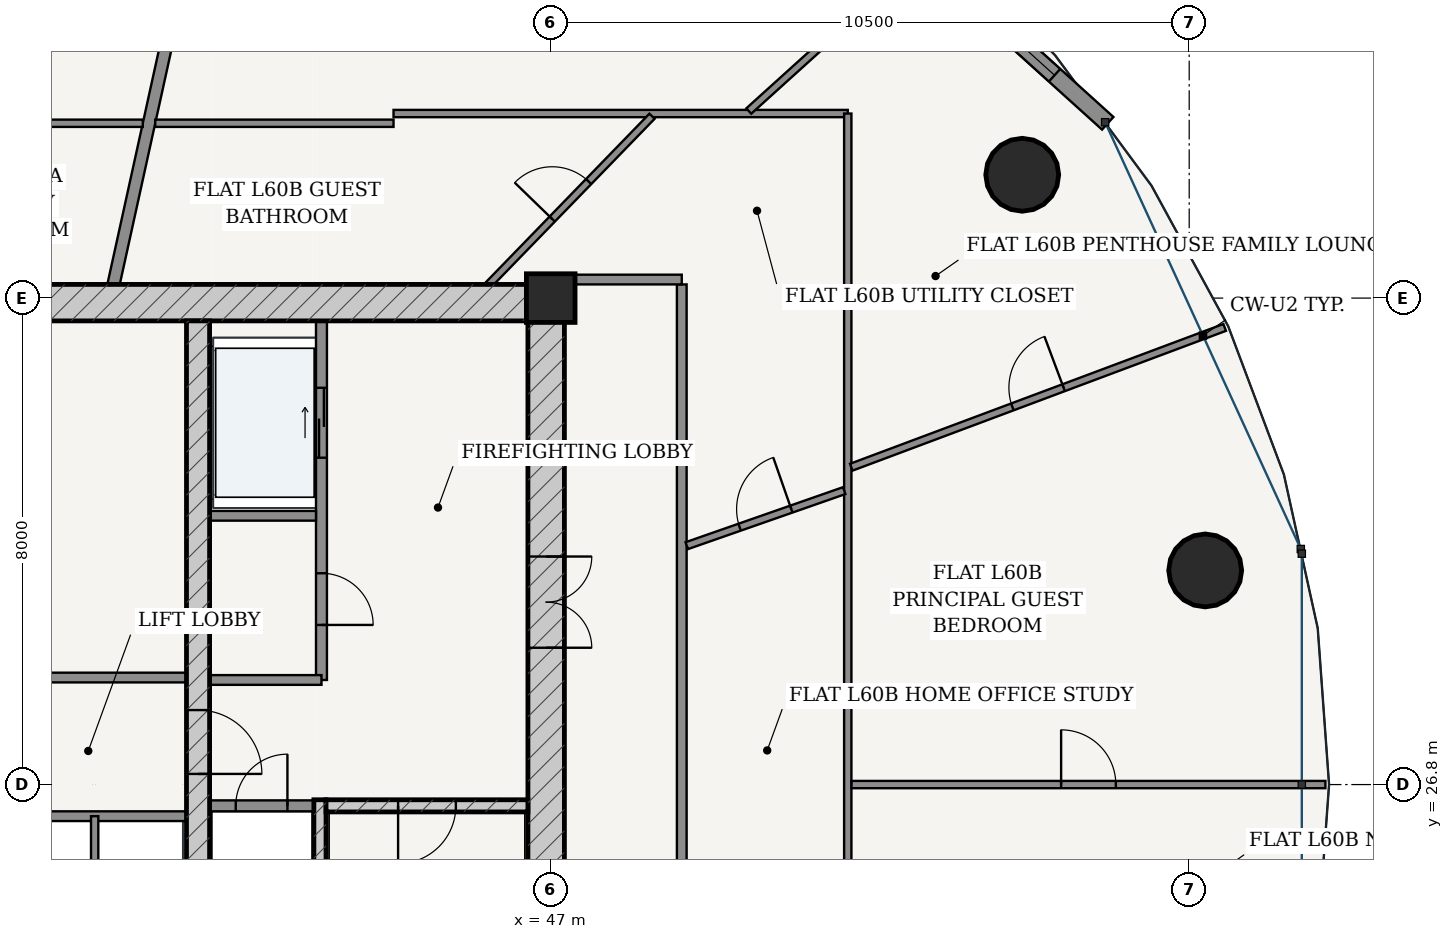
"""IFC4 building model, lengths in metres.
Left out: names, types, materials, properties, quantities, classifications, styles, units other than length and angle.
Written with IfcOpenShell. Run it as: python <this file> out.ifc"""

import sys

from ifc_helpers import new_model, si_unit, direction, frame, frame_2d, origin, origin_2d, place, context, subcontext, project, spatial, rectangle, hollow_circle, extrude, source, transform, mapped, element, fill, save


model = new_model("IFC4")
c1 = context("Model", 3, precision=1e-05, world=origin(), true_north=direction((-0.2419218956, 0.970295726276)))
c2 = subcontext(c1, "Body", "Model", "MODEL_VIEW")
j1 = project(units=[si_unit("LENGTHUNIT", "METRE"), si_unit("PLANEANGLEUNIT", "RADIAN")], contexts=[c1])
p1 = place(None, origin())
s1 = spatial("IfcSite", under=j1, at=p1, CompositionType="ELEMENT")
p2 = place(p1, origin())
s2 = spatial("IfcBuilding", under=s1, at=p2, CompositionType="ELEMENT")
p3 = place(p2, frame((0.0, 0.0, 228.2)))
s3 = spatial("IfcBuildingStorey", under=s2, at=p3, CompositionType="ELEMENT", Elevation=228.2)
p4 = place(p3, frame((47.0, 34.8, 0.0), z_axis=(0.0, 0.0, 1.0), x_axis=(1.0, 0.0, 0.0)))
e1 = element("IfcColumn", 1, at=p4, inside=s3, PredefinedType="COLUMN", context=c2, shape_type="SweptSolid", body=[
    extrude(rectangle(XDim=0.8, YDim=0.8, at=origin_2d()), origin(), (0.0, 0.0, 1.0), 3.7),
])
p5 = place(p3, frame((28.775, 34.725, 0.0), z_axis=(0.0, 0.0, 1.0), x_axis=(1.0, 0.0, 0.0)))
e2 = element("IfcWall", 2, at=p5, inside=s3, PredefinedType="SHEAR", context=c2, shape_type="SweptSolid", body=[
    extrude(rectangle(XDim=18.45, YDim=0.6, at=frame_2d((9.225, 0.0))), origin(), (0.0, 0.0, 1.0), 3.435),
])
p6 = place(p3, frame((46.925, 19.175, 0.0), z_axis=(0.0, 0.0, 1.0), x_axis=(0.0, 1.0, 0.0)))
e3 = element("IfcWall", 3, at=p6, inside=s3, PredefinedType="SHEAR", context=c2, shape_type="SweptSolid", body=[
    extrude(rectangle(XDim=15.25, YDim=0.6, at=frame_2d((7.625, 0.0))), origin(), (0.0, 0.0, 1.0), 3.435),
])
p7 = place(p6, frame((9.875, 0.0, 0.0)))
e4 = element("IfcOpeningElement", 4, at=p7, cuts=e3, PredefinedType="OPENING", context=c2, shape_type="SweptSolid", body=[
    extrude(rectangle(XDim=1.5, YDim=2.2, at=frame_2d((0.75, 1.1))), frame((0.0, 0.31, 0.0), z_axis=(0.0, -1.0, 0.0), x_axis=(1.0, 0.0, 0.0)), (0.0, 0.0, 1.0), 0.62),
])
p8 = place(p3, frame((43.205, 19.175, 0.0), z_axis=(0.0, 0.0, 1.0), x_axis=(0.0, 1.0, 0.0)))
e5 = element("IfcWall", 5, at=p8, inside=s3, PredefinedType="SOLIDWALL", context=c2, shape_type="SweptSolid", body=[
    extrude(rectangle(XDim=7.375, YDim=0.2, at=frame_2d((3.688, 0.0))), origin(), (0.0, 0.0, 1.0), 3.435),
])
p9 = place(p3, frame((43.305, 26.45, 0.0), z_axis=(0.0, 0.0, 1.0), x_axis=(1.0, 0.0, 0.0)))
e6 = element("IfcWall", 6, at=p9, inside=s3, PredefinedType="SOLIDWALL", context=c2, shape_type="SweptSolid", body=[
    extrude(rectangle(XDim=3.32, YDim=0.2, at=frame_2d((1.66, 0.0))), origin(), (0.0, 0.0, 1.0), 3.435),
])
p10 = place(p9, frame((1.185, 0.0, 0.0)))
e7 = element("IfcOpeningElement", 7, at=p10, cuts=e6, PredefinedType="OPENING", context=c2, shape_type="SweptSolid", body=[
    extrude(rectangle(XDim=0.95, YDim=2.15, at=frame_2d((0.475, 1.075))), frame((0.0, 0.11, 0.0), z_axis=(0.0, -1.0, 0.0), x_axis=(1.0, 0.0, 0.0)), (0.0, 0.0, 1.0), 0.22),
])
p11 = place(p3, frame((41.2, 19.175, 0.0), z_axis=(0.0, 0.0, 1.0), x_axis=(0.0, 1.0, 0.0)))
e8 = element("IfcWall", 8, at=p11, inside=s3, PredefinedType="SHEAR", context=c2, shape_type="SweptSolid", body=[
    extrude(rectangle(XDim=15.25, YDim=0.38, at=frame_2d((7.625, 0.0))), origin(), (0.0, 0.0, 1.0), 3.435),
])
p12 = place(p11, frame((7.8, 0.0, 0.0)))
e9 = element("IfcOpeningElement", 9, at=p12, cuts=e8, PredefinedType="OPENING", context=c2, shape_type="SweptSolid", body=[
    extrude(rectangle(XDim=1.05, YDim=2.15, at=frame_2d((0.525, 1.075))), frame((0.0, 0.2, 0.0), z_axis=(0.0, -1.0, 0.0), x_axis=(1.0, 0.0, 0.0)), (0.0, 0.0, 1.0), 0.4),
])
for number, where, z_axis, x_axis in (
    (10, (57.763, 30.321, 0.0), (0.0, 0.0, 1.0), (1.0, 0.0, 0.0)),
    (11, (54.754, 36.828, 0.0), (0.0, 0.0, 1.0), (1.0, 0.0, 0.0)),
):
    element("IfcColumn", number, at=place(p3, frame(where, z_axis=z_axis, x_axis=x_axis)), inside=s3, PredefinedType="COLUMN", context=c2, shape_type="SweptSolid", body=[
        extrude(hollow_circle(Radius=0.6, WallThickness=0.038, at=origin_2d()), origin(), (0.0, 0.0, 1.0), 3.7),
    ])
p13 = place(p3, frame((56.16, 37.674, 0.0), z_axis=(0.0, 0.0, 1.0), x_axis=(-0.741972126783, 0.670430729514, 0.0)))
e12 = element("IfcWall", 12, at=p13, inside=s3, PredefinedType="SOLIDWALL", context=c2, shape_type="SweptSolid", body=[
    extrude(rectangle(XDim=8.255, YDim=0.28, at=frame_2d((4.127, 0.0))), origin(), (0.0, 0.0, 1.0), 3.435),
])
p14 = place(p13, frame((1.179, 0.0, 0.85)))
e13 = element("IfcOpeningElement", 13, at=p14, cuts=e12, PredefinedType="OPENING", context=c2, shape_type="SweptSolid", body=[
    extrude(rectangle(XDim=2.1, YDim=1.95, at=frame_2d((1.05, 0.975))), frame((0.0, 0.15, 0.0), z_axis=(0.0, -1.0, 0.0), x_axis=(1.0, 0.0, 0.0)), (0.0, 0.0, 1.0), 0.3),
])
p15 = place(p13, frame((4.976, 0.0, 0.85)))
e14 = element("IfcOpeningElement", 14, at=p15, cuts=e12, PredefinedType="OPENING", context=c2, shape_type="SweptSolid", body=[
    extrude(rectangle(XDim=2.1, YDim=1.95, at=frame_2d((1.05, 0.975))), frame((0.0, 0.15, 0.0), z_axis=(0.0, -1.0, 0.0), x_axis=(1.0, 0.0, 0.0)), (0.0, 0.0, 1.0), 0.3),
])
p16 = place(p3, frame((41.39, 26.45, 0.0), z_axis=(0.0, 0.0, 1.0), x_axis=(1.0, 0.0, 0.0)))
e15 = element("IfcWall", 15, at=p16, inside=s3, PredefinedType="PARTITIONING", context=c2, shape_type="SweptSolid", body=[
    extrude(rectangle(XDim=1.71, YDim=0.18, at=frame_2d((0.855, 0.0))), origin(), (0.0, 0.0, 1.0), 3.435),
])
p17 = place(p16, frame((0.43, 0.0, 0.0)))
e16 = element("IfcOpeningElement", 16, at=p17, cuts=e15, PredefinedType="OPENING", context=c2, shape_type="SweptSolid", body=[
    extrude(rectangle(XDim=0.85, YDim=2.1, at=frame_2d((0.425, 1.05))), frame((0.0, 0.1, 0.0), z_axis=(0.0, -1.0, 0.0), x_axis=(1.0, 0.0, 0.0)), (0.0, 0.0, 1.0), 0.2),
])
p18 = place(p3, frame((43.23, 28.52, 0.0), z_axis=(0.0, 0.0, 1.0), x_axis=(0.0, 1.0, 0.0)))
e17 = element("IfcWall", 17, at=p18, inside=s3, PredefinedType="PARTITIONING", context=c2, shape_type="SweptSolid", body=[
    extrude(rectangle(XDim=5.905, YDim=0.18, at=frame_2d((2.953, 0.0))), origin(), (0.0, 0.0, 1.0), 3.435),
])
p19 = place(p18, frame((0.905, 0.0, 0.0)))
e18 = element("IfcOpeningElement", 18, at=p19, cuts=e17, PredefinedType="OPENING", context=c2, shape_type="SweptSolid", body=[
    extrude(rectangle(XDim=0.85, YDim=2.1, at=frame_2d((0.425, 1.05))), frame((0.0, 0.1, 0.0), z_axis=(0.0, -1.0, 0.0), x_axis=(1.0, 0.0, 0.0)), (0.0, 0.0, 1.0), 0.2),
])
p20 = place(p18, frame((3.655, 0.0, 0.0)))
e19 = element("IfcOpeningElement", 19, at=p20, cuts=e17, PredefinedType="OPENING", context=c2, shape_type="SweptSolid", body=[
    extrude(rectangle(XDim=1.15, YDim=2.2, at=frame_2d((0.575, 1.1))), frame((0.0, 0.1, 0.0), z_axis=(0.0, -1.0, 0.0), x_axis=(1.0, 0.0, 0.0)), (0.0, 0.0, 1.0), 0.2),
])
p21 = place(p3, frame((41.39, 31.22, 0.0), z_axis=(0.0, 0.0, 1.0), x_axis=(1.0, 0.0, 0.0)))
e20 = element("IfcWall", 20, at=p21, inside=s3, PredefinedType="PARTITIONING", context=c2, shape_type="SweptSolid", body=[
    extrude(rectangle(XDim=1.75, YDim=0.16, at=frame_2d((0.875, 0.0))), origin(), (0.0, 0.0, 1.0), 3.435),
])
p22 = place(p3, frame((41.39, 28.52, 0.0), z_axis=(0.0, 0.0, 1.0), x_axis=(1.0, 0.0, 0.0)))
e21 = element("IfcWall", 21, at=p22, inside=s3, PredefinedType="PARTITIONING", context=c2, shape_type="SweptSolid", body=[
    extrude(rectangle(XDim=1.84, YDim=0.16, at=frame_2d((0.92, 0.0))), origin(), (0.0, 0.0, 1.0), 3.435),
])
p23 = place(p3, frame((34.99, 28.56, 0.0), z_axis=(0.0, 0.0, 1.0), x_axis=(1.0, 0.0, 0.0)))
e22 = element("IfcWall", 22, at=p23, inside=s3, PredefinedType="PARTITIONING", context=c2, shape_type="SweptSolid", body=[
    extrude(rectangle(XDim=6.02, YDim=0.16, at=frame_2d((3.01, 0.0))), origin(), (0.0, 0.0, 1.0), 3.435),
])
p24 = place(p23, frame((2.585, 0.0, 0.0)))
e23 = element("IfcOpeningElement", 23, at=p24, cuts=e22, PredefinedType="OPENING", context=c2, shape_type="SweptSolid", body=[
    extrude(rectangle(XDim=0.85, YDim=2.1, at=frame_2d((0.425, 1.05))), frame((0.0, 0.09, 0.0), z_axis=(0.0, -1.0, 0.0), x_axis=(1.0, 0.0, 0.0)), (0.0, 0.0, 1.0), 0.18),
])
p25 = place(p3, frame((34.99, 26.28, 0.0), z_axis=(0.0, 0.0, 1.0), x_axis=(1.0, 0.0, 0.0)))
e24 = element("IfcWall", 24, at=p25, inside=s3, PredefinedType="PARTITIONING", context=c2, shape_type="SweptSolid", body=[
    extrude(rectangle(XDim=6.02, YDim=0.16, at=frame_2d((3.01, 0.0))), origin(), (0.0, 0.0, 1.0), 3.435),
])
p26 = place(p25, frame((0.225, 0.0, 0.0)))
e25 = element("IfcOpeningElement", 25, at=p26, cuts=e24, PredefinedType="OPENING", context=c2, shape_type="SweptSolid", body=[
    extrude(rectangle(XDim=1.1, YDim=2.2, at=frame_2d((0.55, 1.1))), frame((0.0, 0.09, 0.0), z_axis=(0.0, -1.0, 0.0), x_axis=(1.0, 0.0, 0.0)), (0.0, 0.0, 1.0), 0.18),
])
p27 = place(p25, frame((1.705, 0.0, 0.0)))
e26 = element("IfcOpeningElement", 26, at=p27, cuts=e24, PredefinedType="OPENING", context=c2, shape_type="SweptSolid", body=[
    extrude(rectangle(XDim=1.1, YDim=2.2, at=frame_2d((0.55, 1.1))), frame((0.0, 0.09, 0.0), z_axis=(0.0, -1.0, 0.0), x_axis=(1.0, 0.0, 0.0)), (0.0, 0.0, 1.0), 0.18),
])
p28 = place(p3, frame((39.5, 23.72, 0.0), z_axis=(0.0, 0.0, 1.0), x_axis=(0.0, 1.0, 0.0)))
e27 = element("IfcWall", 27, at=p28, inside=s3, PredefinedType="PARTITIONING", context=c2, shape_type="SweptSolid", body=[
    extrude(rectangle(XDim=2.56, YDim=0.12, at=frame_2d((1.28, 0.0))), origin(), (0.0, 0.0, 1.0), 3.435),
])
p29 = place(p3, frame((49.155, 16.725, 0.0), z_axis=(0.0, 0.0, 1.0), x_axis=(0.0, 1.0, 0.0)))
e28 = element("IfcWall", 28, at=p29, inside=s3, PredefinedType="PARTITIONING", context=c2, shape_type="SweptSolid", body=[
    extrude(rectangle(XDim=18.3, YDim=0.16, at=frame_2d((9.15, 0.0))), origin(), (0.0, 0.0, 1.0), 2.951),
])
p30 = place(p3, frame((47.225, 35.105, 0.0), z_axis=(0.0, 0.0, 1.0), x_axis=(1.0, 0.0, 0.0)))
e29 = element("IfcWall", 29, at=p30, inside=s3, PredefinedType="PARTITIONING", context=c2, shape_type="SweptSolid", body=[
    extrude(rectangle(XDim=1.93, YDim=0.16, at=frame_2d((0.965, 0.0))), origin(), (0.0, 0.0, 1.0), 3.435),
])
p31 = place(p3, frame((39.811, 35.027, 0.0), z_axis=(0.0, 0.0, 1.0), x_axis=(0.214966857327, 0.976621344356, 0.0)))
e30 = element("IfcWall", 30, at=p31, inside=s3, PredefinedType="PARTITIONING", context=c2, shape_type="SweptSolid", body=[
    extrude(rectangle(XDim=11.258, YDim=0.2, at=frame_2d((5.629, 0.0))), origin(), (0.0, 0.0, 1.0), 2.52),
])
p32 = place(p3, frame((31.585, 37.675, 0.0), z_axis=(0.0, 0.0, 1.0), x_axis=(1.0, 0.0, 0.0)))
e31 = element("IfcWall", 31, at=p32, inside=s3, PredefinedType="PARTITIONING", context=c2, shape_type="SweptSolid", body=[
    extrude(rectangle(XDim=8.707, YDim=0.12, at=frame_2d((4.354, 0.0))), origin(), (0.0, 0.0, 1.0), 2.951),
])
p33 = place(p32, frame((1.327, 0.0, 0.0)))
e32 = element("IfcOpeningElement", 32, at=p33, cuts=e31, PredefinedType="OPENING", context=c2, shape_type="SweptSolid", body=[
    extrude(rectangle(XDim=0.9, YDim=2.15, at=frame_2d((0.45, 1.075))), frame((0.0, 0.07, 0.0), z_axis=(0.0, -1.0, 0.0), x_axis=(1.0, 0.0, 0.0)), (0.0, 0.0, 1.0), 0.14),
])
p34 = place(p3, frame((40.496, 37.675, 0.0), z_axis=(0.0, 0.0, 1.0), x_axis=(1.0, 0.0, 0.0)))
e33 = element("IfcWall", 33, at=p34, inside=s3, PredefinedType="PARTITIONING", context=c2, shape_type="SweptSolid", body=[
    extrude(rectangle(XDim=3.919, YDim=0.12, at=frame_2d((1.959, 0.0))), origin(), (0.0, 0.0, 1.0), 2.951),
])
p35 = place(p3, frame((44.415, 37.835, 0.0), z_axis=(0.0, 0.0, 1.0), x_axis=(1.0, 0.0, 0.0)))
e34 = element("IfcWall", 34, at=p35, inside=s3, PredefinedType="PARTITIONING", context=c2, shape_type="SweptSolid", body=[
    extrude(rectangle(XDim=7.47, YDim=0.12, at=frame_2d((3.735, 0.0))), origin(), (0.0, 0.0, 1.0), 2.951),
])
p36 = place(p3, frame((51.885, 37.835, 0.0), z_axis=(0.0, 0.0, 1.0), x_axis=(0.0, -1.0, 0.0)))
e35 = element("IfcWall", 35, at=p36, inside=s3, PredefinedType="PARTITIONING", context=c2, shape_type="SweptSolid", body=[
    extrude(rectangle(XDim=23.92, YDim=0.12, at=frame_2d((11.96, 0.0))), origin(), (0.0, 0.0, 1.0), 2.951),
])
p37 = place(p36, frame((16.558, 0.0, 0.0)))
e36 = element("IfcOpeningElement", 36, at=p37, cuts=e35, PredefinedType="OPENING", context=c2, shape_type="SweptSolid", body=[
    extrude(rectangle(XDim=0.9, YDim=2.15, at=frame_2d((0.45, 1.075))), frame((0.0, 0.07, 0.0), z_axis=(0.0, -1.0, 0.0), x_axis=(1.0, 0.0, 0.0)), (0.0, 0.0, 1.0), 0.14),
])
p38 = place(p3, frame((51.947, 26.8, 0.0), z_axis=(0.0, 0.0, 1.0), x_axis=(1.0, 0.0, 0.0)))
e37 = element("IfcWall", 37, at=p38, inside=s3, PredefinedType="PARTITIONING", context=c2, shape_type="SweptSolid", body=[
    extrude(rectangle(XDim=7.793, YDim=0.12, at=frame_2d((3.896, 0.0))), origin(), (0.0, 0.0, 1.0), 2.951),
])
p39 = place(p38, frame((3.447, 0.0, 0.0)))
e38 = element("IfcOpeningElement", 38, at=p39, cuts=e37, PredefinedType="OPENING", context=c2, shape_type="SweptSolid", body=[
    extrude(rectangle(XDim=0.9, YDim=2.15, at=frame_2d((0.45, 1.075))), frame((0.0, 0.07, 0.0), z_axis=(0.0, -1.0, 0.0), x_axis=(1.0, 0.0, 0.0)), (0.0, 0.0, 1.0), 0.14),
])
p40 = place(p3, frame((51.943, 32.019, 0.0), z_axis=(0.0, 0.0, 1.0), x_axis=(0.936540194592, 0.350560214389, 0.0)))
e39 = element("IfcWall", 39, at=p40, inside=s3, PredefinedType="PARTITIONING", context=c2, shape_type="SweptSolid", body=[
    extrude(rectangle(XDim=6.556, YDim=0.12, at=frame_2d((3.278, 0.0))), origin(), (0.0, 0.0, 1.0), 2.951),
])
p41 = place(p40, frame((2.828, 0.0, 0.0)))
e40 = element("IfcOpeningElement", 40, at=p41, cuts=e39, PredefinedType="OPENING", context=c2, shape_type="SweptSolid", body=[
    extrude(rectangle(XDim=0.9, YDim=2.15, at=frame_2d((0.45, 1.075))), frame((0.0, 0.07, 0.0), z_axis=(0.0, -1.0, 0.0), x_axis=(1.0, 0.0, 0.0)), (0.0, 0.0, 1.0), 0.14),
])
p42 = place(p3, frame((50.257, 37.876, 0.0), z_axis=(0.0, 0.0, 1.0), x_axis=(0.741943837234, 0.670462036502, 0.0)))
e41 = element("IfcWall", 41, at=p42, inside=s3, PredefinedType="PARTITIONING", context=c2, shape_type="SweptSolid", body=[
    extrude(rectangle(XDim=4.194, YDim=0.12, at=frame_2d((2.097, 0.0))), origin(), (0.0, 0.0, 1.0), 2.951),
])
p43 = place(p42, frame((1.647, 0.0, 0.0)))
e42 = element("IfcOpeningElement", 42, at=p43, cuts=e41, PredefinedType="OPENING", context=c2, shape_type="SweptSolid", body=[
    extrude(rectangle(XDim=0.9, YDim=2.15, at=frame_2d((0.45, 1.075))), frame((0.0, 0.07, 0.0), z_axis=(0.0, -1.0, 0.0), x_axis=(1.0, 0.0, 0.0)), (0.0, 0.0, 1.0), 0.14),
])
p44 = place(p3, frame((49.237, 30.729, 0.0), z_axis=(0.0, 0.0, 1.0), x_axis=(0.94398177501, 0.329997588549, 0.0)))
e43 = element("IfcWall", 43, at=p44, inside=s3, PredefinedType="PARTITIONING", context=c2, shape_type="SweptSolid", body=[
    extrude(rectangle(XDim=2.743, YDim=0.12, at=frame_2d((1.372, 0.0))), origin(), (0.0, 0.0, 1.0), 3.11),
])
p45 = place(p44, frame((0.922, 0.0, 0.0)))
e44 = element("IfcOpeningElement", 44, at=p45, cuts=e43, PredefinedType="OPENING", context=c2, shape_type="SweptSolid", body=[
    extrude(rectangle(XDim=0.9, YDim=2.15, at=frame_2d((0.45, 1.075))), frame((0.0, 0.07, 0.0), z_axis=(0.0, -1.0, 0.0), x_axis=(1.0, 0.0, 0.0)), (0.0, 0.0, 1.0), 0.14),
])
p46 = place(p3, frame((45.983, 35.026, 0.0), z_axis=(0.0, 0.0, 1.0), x_axis=(0.696410097703, 0.717644045344, 0.0)))
e45 = element("IfcWall", 45, at=p46, inside=s3, PredefinedType="PARTITIONING", context=c2, shape_type="SweptSolid", body=[
    extrude(rectangle(XDim=3.852, YDim=0.12, at=frame_2d((1.926, 0.0))), origin(), (0.0, 0.0, 1.0), 2.951),
])
p47 = place(p46, frame((1.496, 0.0, 0.0)))
e46 = element("IfcOpeningElement", 46, at=p47, cuts=e45, PredefinedType="OPENING", context=c2, shape_type="SweptSolid", body=[
    extrude(rectangle(XDim=0.86, YDim=2.15, at=frame_2d((0.43, 1.075))), frame((0.0, 0.07, 0.0), z_axis=(0.0, -1.0, 0.0), x_axis=(1.0, 0.0, 0.0)), (0.0, 0.0, 1.0), 0.14),
])
m1 = source(origin(), c2, "Body", "SweptSolid", [
    extrude(rectangle(XDim=2.1, YDim=1.95, at=frame_2d((1.05, 0.975))), frame((0.0, 0.03, 0.0), z_axis=(0.0, -1.0, 0.0), x_axis=(1.0, 0.0, 0.0)), (0.0, 0.0, 1.0), 0.06),
])
p48 = place(p14, origin())
e47 = element("IfcWindow", 47, at=p48, inside=s3, PartitioningType="SINGLE_PANEL", PredefinedType="WINDOW", context=c2, shape_type="MappedRepresentation", body=[
    mapped(m1, transform((0.0, 0.0, 0.0), scale=1.0)),
])
fill(e13, e47)
m2 = source(origin(), c2, "Body", "SweptSolid", [
    extrude(rectangle(XDim=1.5, YDim=2.2, at=frame_2d((0.75, 1.1))), frame((0.0, 0.025, 0.0), z_axis=(0.0, -1.0, 0.0), x_axis=(1.0, 0.0, 0.0)), (0.0, 0.0, 1.0), 0.05),
])
p49 = place(p7, frame((1.5, 0.0, 0.0), z_axis=(0.0, 0.0, 1.0), x_axis=(-1.0, 0.0, 0.0)))
e48 = element("IfcDoor", 48, at=p49, inside=s3, OperationType="DOUBLE_DOOR_SINGLE_SWING", PredefinedType="DOOR", context=c2, shape_type="MappedRepresentation", body=[
    mapped(m2, transform((0.0, 0.0, 0.0), scale=1.0)),
])
fill(e4, e48)
m3 = source(origin(), c2, "Body", "SweptSolid", [
    extrude(rectangle(XDim=1.05, YDim=2.15, at=frame_2d((0.525, 1.075))), frame((0.0, 0.025, 0.0), z_axis=(0.0, -1.0, 0.0), x_axis=(1.0, 0.0, 0.0)), (0.0, 0.0, 1.0), 0.05),
])
p50 = place(p12, frame((1.05, 0.0, 0.0), z_axis=(0.0, 0.0, 1.0), x_axis=(-1.0, 0.0, 0.0)))
e49 = element("IfcDoor", 49, at=p50, inside=s3, OperationType="SINGLE_SWING_RIGHT", PredefinedType="DOOR", context=c2, shape_type="MappedRepresentation", body=[
    mapped(m3, transform((0.0, 0.0, 0.0), scale=1.0)),
])
fill(e9, e49)
m4 = source(origin(), c2, "Body", "SweptSolid", [
    extrude(rectangle(XDim=0.95, YDim=2.15, at=frame_2d((0.475, 1.075))), frame((0.0, 0.025, 0.0), z_axis=(0.0, -1.0, 0.0), x_axis=(1.0, 0.0, 0.0)), (0.0, 0.0, 1.0), 0.05),
])
p51 = place(p10, frame((0.95, 0.0, 0.0), z_axis=(0.0, 0.0, 1.0), x_axis=(-1.0, 0.0, 0.0)))
e50 = element("IfcDoor", 50, at=p51, inside=s3, OperationType="SINGLE_SWING_RIGHT", PredefinedType="DOOR", context=c2, shape_type="MappedRepresentation", body=[
    mapped(m4, transform((0.0, 0.0, 0.0), scale=1.0)),
])
fill(e7, e50)
m5 = source(origin(), c2, "Body", "SweptSolid", [
    extrude(rectangle(XDim=0.85, YDim=2.1, at=frame_2d((0.425, 1.05))), frame((0.0, 0.025, 0.0), z_axis=(0.0, -1.0, 0.0), x_axis=(1.0, 0.0, 0.0)), (0.0, 0.0, 1.0), 0.05),
])
p52 = place(p17, origin())
e51 = element("IfcDoor", 51, at=p52, inside=s3, OperationType="SINGLE_SWING_RIGHT", PredefinedType="DOOR", context=c2, shape_type="MappedRepresentation", body=[
    mapped(m5, transform((0.0, 0.0, 0.0), scale=1.0)),
])
fill(e16, e51)
p53 = place(p19, frame((0.85, 0.0, 0.0), z_axis=(0.0, 0.0, 1.0), x_axis=(-1.0, 0.0, 0.0)))
e52 = element("IfcDoor", 52, at=p53, inside=s3, OperationType="SINGLE_SWING_RIGHT", PredefinedType="DOOR", context=c2, shape_type="MappedRepresentation", body=[
    mapped(m5, transform((0.0, 0.0, 0.0), scale=1.0)),
])
fill(e18, e52)
m6 = source(origin(), c2, "Body", "SweptSolid", [
    extrude(rectangle(XDim=1.15, YDim=2.2, at=frame_2d((0.575, 1.1))), frame((0.0, 0.025, 0.0), z_axis=(0.0, -1.0, 0.0), x_axis=(1.0, 0.0, 0.0)), (0.0, 0.0, 1.0), 0.05),
])
p54 = place(p20, origin())
e53 = element("IfcDoor", 53, at=p54, inside=s3, OperationType="DOUBLE_DOOR_SLIDING", PredefinedType="DOOR", context=c2, shape_type="MappedRepresentation", body=[
    mapped(m6, transform((0.0, 0.0, 0.0), scale=1.0)),
])
fill(e19, e53)
m7 = source(origin(), c2, "Body", "SweptSolid", [
    extrude(rectangle(XDim=0.9, YDim=2.15, at=frame_2d((0.45, 1.075))), frame((0.0, 0.025, 0.0), z_axis=(0.0, -1.0, 0.0), x_axis=(1.0, 0.0, 0.0)), (0.0, 0.0, 1.0), 0.05),
])
p55 = place(p45, origin())
e54 = element("IfcDoor", 54, at=p55, inside=s3, OperationType="SINGLE_SWING_RIGHT", PredefinedType="DOOR", context=c2, shape_type="MappedRepresentation", body=[
    mapped(m7, transform((0.0, 0.0, 0.0), scale=1.0)),
])
fill(e44, e54)
m8 = source(origin(), c2, "Body", "SweptSolid", [
    extrude(rectangle(XDim=0.86, YDim=2.15, at=frame_2d((0.43, 1.075))), frame((0.0, 0.025, 0.0), z_axis=(0.0, -1.0, 0.0), x_axis=(1.0, 0.0, 0.0)), (0.0, 0.0, 1.0), 0.05),
])
p56 = place(p47, origin())
e55 = element("IfcDoor", 55, at=p56, inside=s3, OperationType="SINGLE_SWING_LEFT", PredefinedType="DOOR", context=c2, shape_type="MappedRepresentation", body=[
    mapped(m8, transform((0.0, 0.0, 0.0), scale=1.0)),
])
fill(e46, e55)
p57 = place(p39, origin())
e56 = element("IfcDoor", 56, at=p57, inside=s3, OperationType="SINGLE_SWING_LEFT", PredefinedType="DOOR", context=c2, shape_type="MappedRepresentation", body=[
    mapped(m7, transform((0.0, 0.0, 0.0), scale=1.0)),
])
fill(e38, e56)
p58 = place(p41, origin())
e57 = element("IfcDoor", 57, at=p58, inside=s3, OperationType="SINGLE_SWING_RIGHT", PredefinedType="DOOR", context=c2, shape_type="MappedRepresentation", body=[
    mapped(m7, transform((0.0, 0.0, 0.0), scale=1.0)),
])
fill(e40, e57)
save(model, sys.argv[1])
